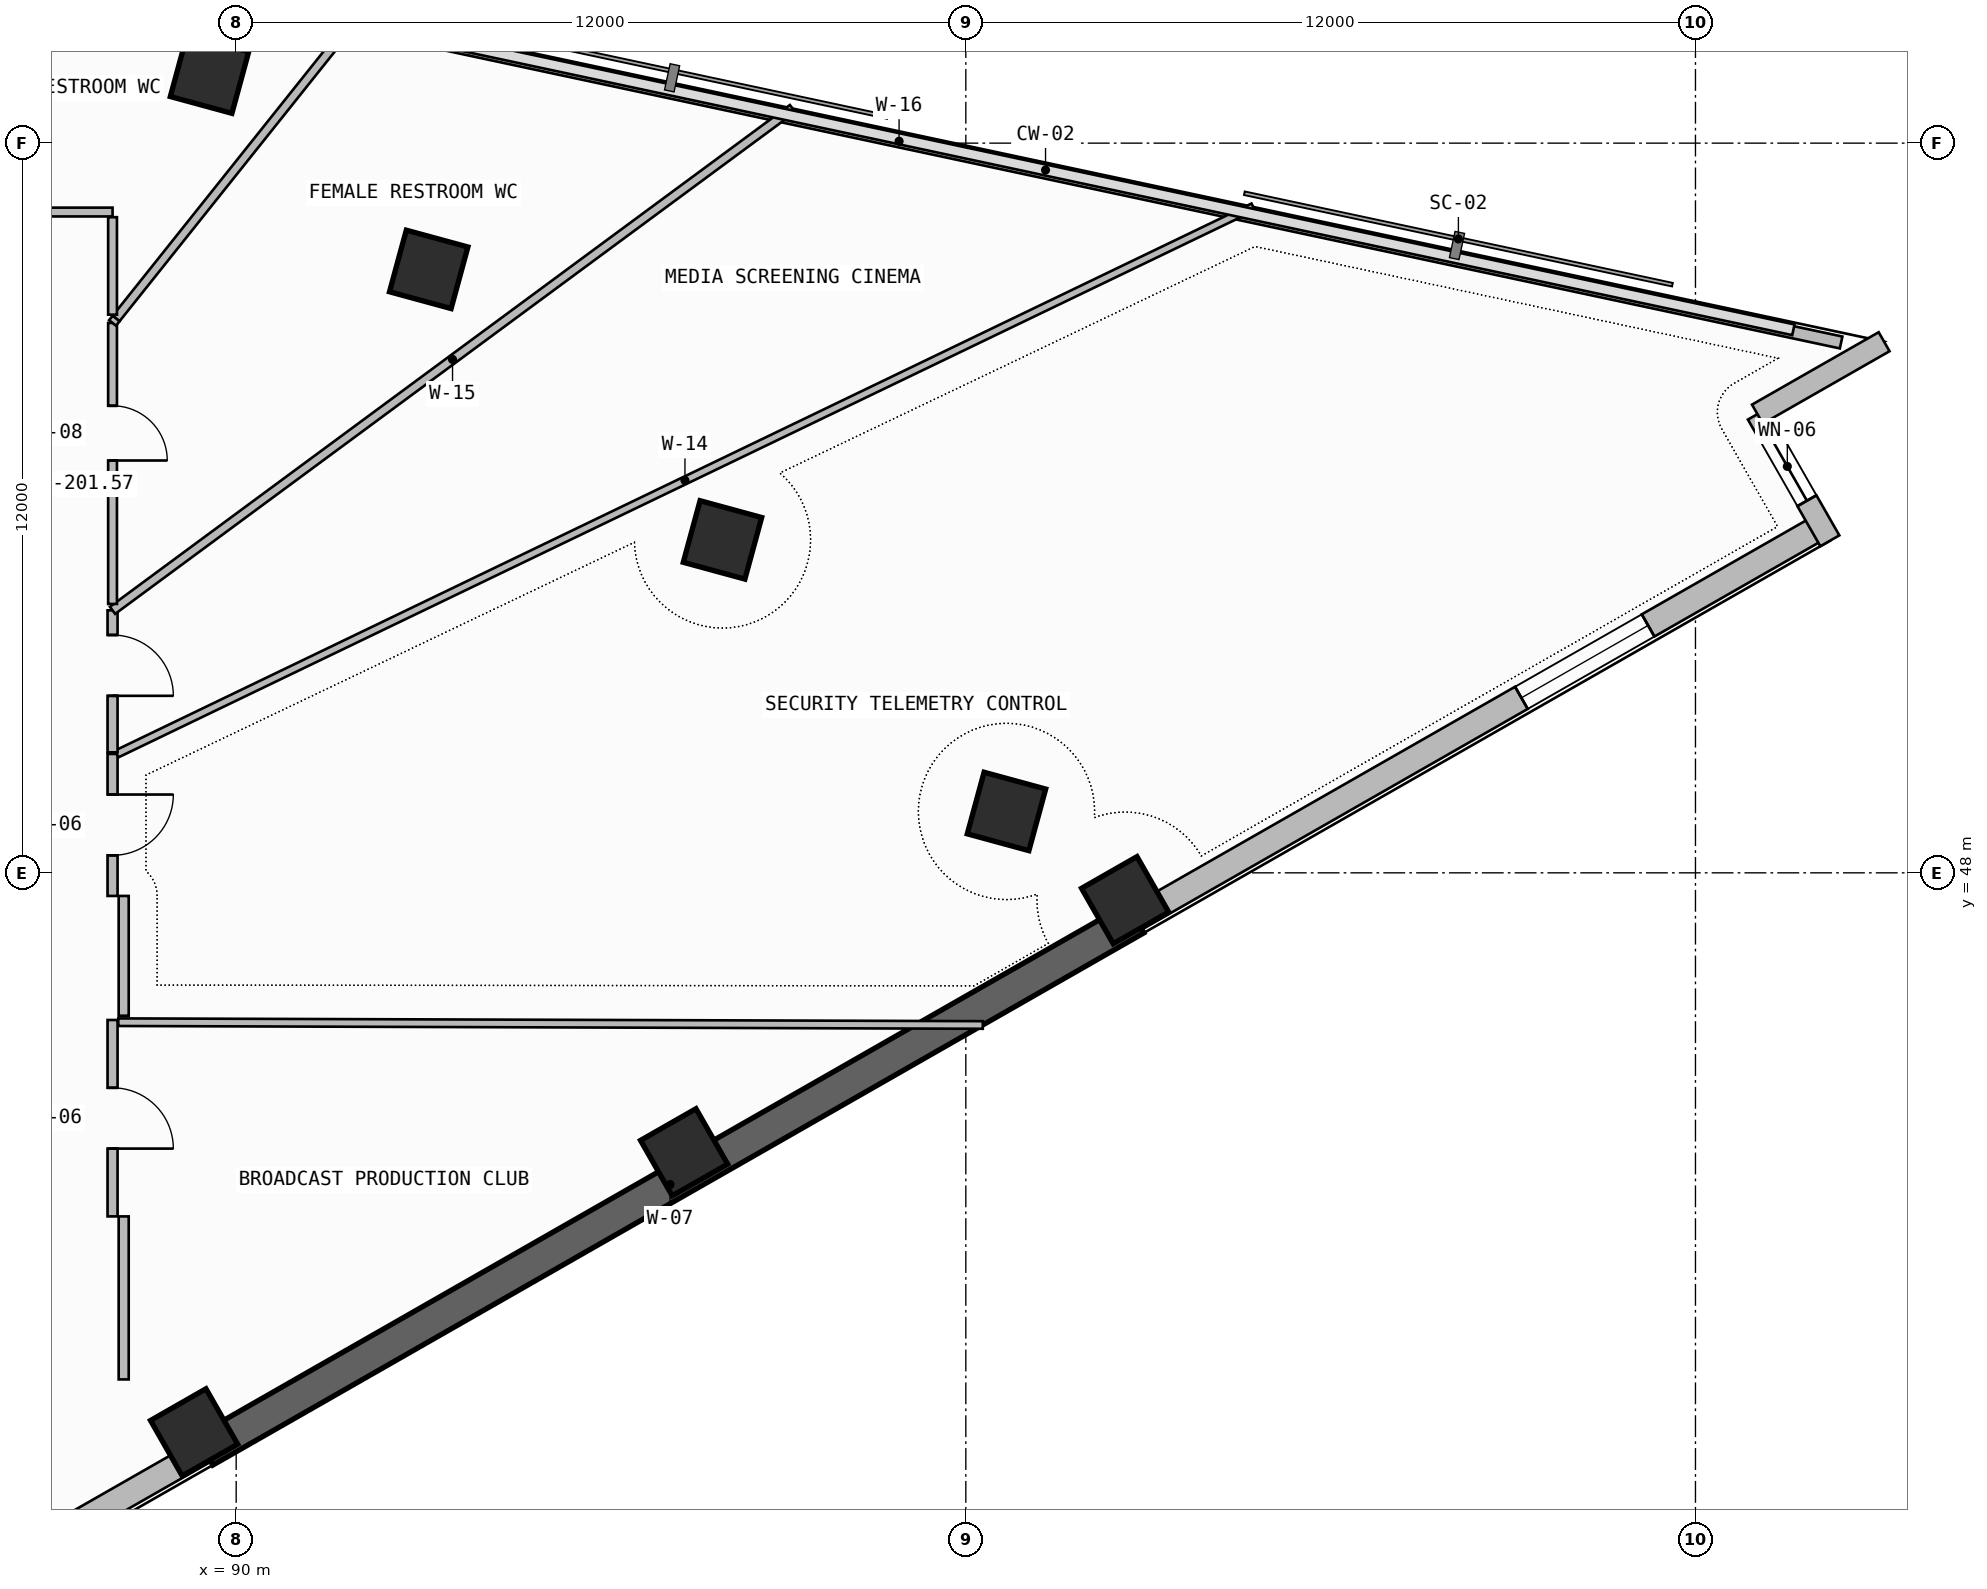
"""IFC4 building model, lengths in metres.
Left out: names, types, materials, properties, quantities, classifications, styles, units other than length and angle.
Written with IfcOpenShell. Run it as: python <this file> out.ifc"""

import sys

from ifc_helpers import new_model, si_unit, direction, frame, frame_2d, origin, origin_2d, place, context, subcontext, project, spatial, rectangle, extrude, element, fill, save


model = new_model("IFC4")
c1 = context("Model", 3, precision=1e-05, world=origin(), true_north=direction((0.0, 1.0)))
c2 = subcontext(c1, "Body", "Model", "MODEL_VIEW")
j1 = project(units=[si_unit("LENGTHUNIT", "METRE"), si_unit("PLANEANGLEUNIT", "RADIAN")], contexts=[c1])
p1 = place(None, origin())
s1 = spatial("IfcSite", under=j1, at=p1, CompositionType="ELEMENT")
p2 = place(p1, origin())
s2 = spatial("IfcBuilding", under=s1, at=p2, CompositionType="ELEMENT")
p3 = place(p2, frame((0.0, 0.0, 204.42)))
s3 = spatial("IfcBuildingStorey", under=s2, at=p3, CompositionType="ELEMENT", Elevation=204.42)
for number, where, z_axis, x_axis in (
    (1, (89.308, 38.799, 0.0), (0.0, 0.0, 1.0), (0.868, 0.496, 0.0)),
    (2, (97.367, 43.405, 0.0), (0.0, 0.0, 1.0), (0.868, 0.496, 0.0)),
    (3, (104.62, 47.55, 0.0), (0.0, 0.0, 1.0), (0.868, 0.496, 0.0)),
    (4, (102.669, 49.01, 0.0), (0.0, 0.0, 1.0), (0.263, 0.965, 0.0)),
    (5, (97.998, 53.475, 0.0), (0.0, 0.0, 1.0), (0.263, 0.965, 0.0)),
    (6, (93.167, 57.924, 0.0), (0.0, 0.0, 1.0), (0.263, 0.965, 0.0)),
    (7, (89.562, 61.135, 0.0), (0.0, 0.0, 1.0), (0.263, 0.965, 0.0)),
):
    element("IfcColumn", number, at=place(p3, frame(where, z_axis=z_axis, x_axis=x_axis)), inside=s3, PredefinedType="COLUMN", context=c2, shape_type="SweptSolid", body=[
        extrude(rectangle(XDim=1.05, YDim=1.05, at=origin_2d()), origin(), (0.0, 0.0, 1.0), 3.52),
    ])
p4 = place(p3, frame((86.1, 36.568, 0.0), z_axis=(0.0, 0.0, 1.0), x_axis=(0.868192956745, 0.496226752461, 0.0)))
e8 = element("IfcWall", 8, at=p4, inside=s3, PredefinedType="SOLIDWALL", context=c2, shape_type="SweptSolid", body=[
    extrude(rectangle(XDim=3.892, YDim=0.42, at=frame_2d((1.946, 0.0))), origin(), (0.0, 0.0, 1.0), 2.245),
])
p5 = place(p3, frame((89.479, 38.499, -0.26), z_axis=(0.0, 0.0, 1.0), x_axis=(0.868197136736, 0.496219439123, 0.0)))
e9 = element("IfcWall", 9, at=p5, inside=s3, PredefinedType="SHEAR", context=c2, shape_type="SweptSolid", body=[
    extrude(rectangle(XDim=17.636, YDim=0.55, at=frame_2d((8.818, 0.0))), origin(), (0.0, 0.0, 1.0), 3.52),
])
p6 = place(p3, frame((104.791, 47.25, 0.0), z_axis=(0.0, 0.0, 1.0), x_axis=(0.868193423982, 0.496225934987, 0.0)))
e10 = element("IfcWall", 10, at=p6, inside=s3, PredefinedType="SOLIDWALL", context=c2, shape_type="SweptSolid", body=[
    extrude(rectangle(XDim=12.995, YDim=0.42, at=frame_2d((6.498, 0.0))), origin(), (0.0, 0.0, 1.0), 2.245),
])
p7 = place(p6, frame((7.31, 0.0, 0.965)))
e11 = element("IfcOpeningElement", 11, at=p7, cuts=e10, PredefinedType="OPENING", context=c2, shape_type="SweptSolid", body=[
    extrude(rectangle(XDim=2.4, YDim=1.2, at=frame_2d((1.2, 0.6))), frame((0.0, 0.22, 0.0), z_axis=(0.0, -1.0, 0.0), x_axis=(1.0, 0.0, 0.0)), (0.0, 0.0, 1.0), 0.44),
])
p8 = place(p3, frame((116.21, 53.46, 0.0), z_axis=(0.0, 0.0, 1.0), x_axis=(-0.496215637313, 0.868199309655, 0.0)))
e12 = element("IfcWall", 12, at=p8, inside=s3, PredefinedType="SOLIDWALL", context=c2, shape_type="SweptSolid", body=[
    extrude(rectangle(XDim=2.399, YDim=0.36, at=frame_2d((1.2, 0.0))), origin(), (0.0, 0.0, 1.0), 3.26),
])
p9 = place(p8, frame((0.76, 0.0, 0.45)))
e13 = element("IfcOpeningElement", 13, at=p9, cuts=e12, PredefinedType="OPENING", context=c2, shape_type="SweptSolid", body=[
    extrude(rectangle(XDim=1.3, YDim=2.4, at=frame_2d((0.65, 1.2))), frame((0.0, 0.19, 0.0), z_axis=(0.0, -1.0, 0.0), x_axis=(1.0, 0.0, 0.0)), (0.0, 0.0, 1.0), 0.38),
])
p10 = place(p3, frame((115.019, 55.543, 0.0), z_axis=(0.0, 0.0, 1.0), x_axis=(0.86818053093, 0.4962484919, 0.0)))
e14 = element("IfcWall", 14, at=p10, inside=s3, PredefinedType="SOLIDWALL", context=c2, shape_type="SweptSolid", body=[
    extrude(rectangle(XDim=2.4, YDim=0.36, at=frame_2d((1.2, 0.0))), origin(), (0.0, 0.0, 1.0), 3.26),
])
p11 = place(p3, frame((116.396, 56.722, 0.0), z_axis=(0.0, 0.0, 1.0), x_axis=(-0.977936620644, 0.208901809478, 0.0)))
e15 = element("IfcWall", 15, at=p11, inside=s3, PredefinedType="PARAPET", context=c2, shape_type="SweptSolid", body=[
    extrude(rectangle(XDim=31.685, YDim=0.2, at=frame_2d((15.843, 0.0))), origin(), (0.0, 0.0, 1.0), 1.15),
])
p12 = place(p3, frame((87.967, 42.35, 0.0), z_axis=(0.0, 0.0, 1.0), x_axis=(0.0, 1.0, 0.0)))
e16 = element("IfcWall", 16, at=p12, inside=s3, PredefinedType="PARTITIONING", context=c2, shape_type="SweptSolid", body=[
    extrude(rectangle(XDim=3.23, YDim=0.165, at=frame_2d((1.615, 0.0))), origin(), (0.0, 0.0, 1.0), 2.745),
])
p13 = place(p12, frame((1.115, 0.0, 0.0)))
e17 = element("IfcOpeningElement", 17, at=p13, cuts=e16, PredefinedType="OPENING", context=c2, shape_type="SweptSolid", body=[
    extrude(rectangle(XDim=1.0, YDim=2.2, at=frame_2d((0.5, 1.1))), frame((0.0, 0.093, 0.0), z_axis=(0.0, -1.0, 0.0), x_axis=(1.0, 0.0, 0.0)), (0.0, 0.0, 1.0), 0.185),
])
p14 = place(p3, frame((88.15, 39.669, 0.0), z_axis=(0.0, 0.0, 1.0), x_axis=(0.0, 1.0, 0.0)))
e18 = element("IfcWall", 18, at=p14, inside=s3, PredefinedType="PARTITIONING", context=c2, shape_type="SweptSolid", body=[
    extrude(rectangle(XDim=2.681, YDim=0.165, at=frame_2d((1.34, 0.0))), origin(), (0.0, 0.0, 1.0), 2.745),
])
p15 = place(p3, frame((88.061, 45.544, 0.0), z_axis=(0.0, 0.0, 1.0), x_axis=(0.999994844725, -0.003211000497, 0.0)))
e19 = element("IfcWall", 19, at=p15, inside=s3, PredefinedType="PARTITIONING", context=c2, shape_type="SweptSolid", body=[
    extrude(rectangle(XDim=14.218, YDim=0.125, at=frame_2d((7.109, 0.0))), origin(), (0.0, 0.0, 1.0), 2.245),
])
p16 = place(p3, frame((87.967, 47.62, 0.0), z_axis=(0.0, 0.0, 1.0), x_axis=(0.0, 1.0, 0.0)))
e20 = element("IfcWall", 20, at=p16, inside=s3, PredefinedType="PARTITIONING", context=c2, shape_type="SweptSolid", body=[
    extrude(rectangle(XDim=2.335, YDim=0.165, at=frame_2d((1.167, 0.0))), origin(), (0.0, 0.0, 1.0), 3.26),
])
p17 = place(p16, frame((0.667, 0.0, 0.0)))
e21 = element("IfcOpeningElement", 21, at=p17, cuts=e20, PredefinedType="OPENING", context=c2, shape_type="SweptSolid", body=[
    extrude(rectangle(XDim=1.0, YDim=2.2, at=frame_2d((0.5, 1.1))), frame((0.0, 0.093, 0.0), z_axis=(0.0, -1.0, 0.0), x_axis=(1.0, 0.0, 0.0)), (0.0, 0.0, 1.0), 0.185),
])
p18 = place(p3, frame((88.15, 45.65, 0.0), z_axis=(0.0, 0.0, 1.0), x_axis=(0.0, 1.0, 0.0)))
e22 = element("IfcWall", 22, at=p18, inside=s3, PredefinedType="PARTITIONING", context=c2, shape_type="SweptSolid", body=[
    extrude(rectangle(XDim=1.97, YDim=0.165, at=frame_2d((0.985, 0.0))), origin(), (0.0, 0.0, 1.0), 3.26),
])
p19 = place(p3, frame((88.036, 49.955, 0.0), z_axis=(0.0, 0.0, 1.0), x_axis=(0.90105618902, 0.433702368253, 0.0)))
e23 = element("IfcWall", 23, at=p19, inside=s3, PredefinedType="PARTITIONING", context=c2, shape_type="SweptSolid", body=[
    extrude(rectangle(XDim=20.742, YDim=0.125, at=frame_2d((10.371, 0.0))), origin(), (0.0, 0.0, 1.0), 2.645),
])
p20 = place(p3, frame((87.967, 49.982, 0.0), z_axis=(0.0, 0.0, 1.0), x_axis=(0.0, 1.0, 0.0)))
e24 = element("IfcWall", 24, at=p20, inside=s3, PredefinedType="PARTITIONING", context=c2, shape_type="SweptSolid", body=[
    extrude(rectangle(XDim=2.335, YDim=0.165, at=frame_2d((1.167, 0.0))), origin(), (0.0, 0.0, 1.0), 3.26),
])
p21 = place(p20, frame((0.929, 0.0, 0.0)))
e25 = element("IfcOpeningElement", 25, at=p21, cuts=e24, PredefinedType="OPENING", context=c2, shape_type="SweptSolid", body=[
    extrude(rectangle(XDim=1.0, YDim=2.2, at=frame_2d((0.5, 1.1))), frame((0.0, 0.093, 0.0), z_axis=(0.0, -1.0, 0.0), x_axis=(1.0, 0.0, 0.0)), (0.0, 0.0, 1.0), 0.185),
])
p22 = place(p3, frame((87.967, 52.317, 0.0), z_axis=(0.0, 0.0, 1.0), x_axis=(0.804642818132, 0.593759155911, 0.0)))
e26 = element("IfcWall", 26, at=p22, inside=s3, PredefinedType="PARTITIONING", context=c2, shape_type="SweptSolid", body=[
    extrude(rectangle(XDim=13.898, YDim=0.145, at=frame_2d((6.949, 0.0))), origin(), (0.0, 0.0, 1.0), 2.645),
])
p23 = place(p3, frame((87.967, 52.422, 0.0), z_axis=(0.0, 0.0, 1.0), x_axis=(0.0, 1.0, 0.0)))
e27 = element("IfcWall", 27, at=p23, inside=s3, PredefinedType="PARTITIONING", context=c2, shape_type="SweptSolid", body=[
    extrude(rectangle(XDim=4.621, YDim=0.145, at=frame_2d((2.311, 0.0))), origin(), (0.0, 0.0, 1.0), 2.745),
])
p24 = place(p23, frame((2.359, 0.0, 0.0)))
e28 = element("IfcOpeningElement", 28, at=p24, cuts=e27, PredefinedType="OPENING", context=c2, shape_type="SweptSolid", body=[
    extrude(rectangle(XDim=0.9, YDim=2.1, at=frame_2d((0.45, 1.05))), frame((0.0, 0.083, 0.0), z_axis=(0.0, -1.0, 0.0), x_axis=(1.0, 0.0, 0.0)), (0.0, 0.0, 1.0), 0.165),
])
p25 = place(p3, frame((87.967, 57.043, 0.0), z_axis=(0.0, 0.0, 1.0), x_axis=(0.62407609663, 0.781363568139, 0.0)))
e29 = element("IfcWall", 29, at=p25, inside=s3, PredefinedType="PARTITIONING", context=c2, shape_type="SweptSolid", body=[
    extrude(rectangle(XDim=0.096, YDim=0.145, at=frame_2d((0.048, 0.0))), origin(), (0.0, 0.0, 1.0), 2.745),
])
p26 = place(p3, frame((88.027, 57.118, 0.0), z_axis=(0.0, 0.0, 1.0), x_axis=(0.623829889611, 0.781560150486, 0.0)))
e30 = element("IfcWall", 30, at=p26, inside=s3, PredefinedType="PARTITIONING", context=c2, shape_type="SweptSolid", body=[
    extrude(rectangle(XDim=6.369, YDim=0.145, at=frame_2d((3.185, 0.0))), origin(), (0.0, 0.0, 1.0), 2.645),
])
p27 = place(p3, frame((87.967, 58.867, 0.0), z_axis=(0.0, 0.0, 1.0), x_axis=(-1.0, 0.0, 0.0)))
e31 = element("IfcWall", 31, at=p27, inside=s3, PredefinedType="PARTITIONING", context=c2, shape_type="SweptSolid", body=[
    extrude(rectangle(XDim=5.884, YDim=0.145, at=frame_2d((2.942, 0.0))), origin(), (0.0, 0.0, 1.0), 2.745),
])
p28 = place(p27, frame((3.179, 0.0, 0.0)))
e32 = element("IfcOpeningElement", 32, at=p28, cuts=e31, PredefinedType="OPENING", context=c2, shape_type="SweptSolid", body=[
    extrude(rectangle(XDim=0.9, YDim=2.1, at=frame_2d((0.45, 1.05))), frame((0.0, 0.083, 0.0), z_axis=(0.0, -1.0, 0.0), x_axis=(1.0, 0.0, 0.0)), (0.0, 0.0, 1.0), 0.165),
])
p29 = place(p3, frame((87.967, 57.179, 0.0), z_axis=(0.0, 0.0, 1.0), x_axis=(0.0, 1.0, 0.0)))
e33 = element("IfcWall", 33, at=p29, inside=s3, PredefinedType="PARTITIONING", context=c2, shape_type="SweptSolid", body=[
    extrude(rectangle(XDim=1.604, YDim=0.145, at=frame_2d((0.802, 0.0))), origin(), (0.0, 0.0, 1.0), 2.745),
])
p30 = place(p7, origin())
e34 = element("IfcWindow", 34, at=p30, inside=s3, PartitioningType="SINGLE_PANEL", PredefinedType="WINDOW", context=c2, shape_type="SweptSolid", body=[
    extrude(rectangle(XDim=2.4, YDim=1.2, at=frame_2d((1.2, 0.6))), frame((0.0, 0.03, 0.0), z_axis=(0.0, -1.0, 0.0), x_axis=(1.0, 0.0, 0.0)), (0.0, 0.0, 1.0), 0.06),
])
fill(e11, e34)
p31 = place(p9, origin())
e35 = element("IfcWindow", 35, at=p31, inside=s3, PartitioningType="SINGLE_PANEL", PredefinedType="WINDOW", context=c2, shape_type="SweptSolid", body=[
    extrude(rectangle(XDim=1.3, YDim=2.4, at=frame_2d((0.65, 1.2))), frame((0.0, 0.03, 0.0), z_axis=(0.0, -1.0, 0.0), x_axis=(1.0, 0.0, 0.0)), (0.0, 0.0, 1.0), 0.06),
])
fill(e13, e35)
p32 = place(p13, frame((1.0, 0.0, 0.0), z_axis=(0.0, 0.0, 1.0), x_axis=(-1.0, 0.0, 0.0)))
e36 = element("IfcDoor", 36, at=p32, inside=s3, OperationType="SINGLE_SWING_RIGHT", PredefinedType="DOOR", context=c2, shape_type="SweptSolid", body=[
    extrude(rectangle(XDim=1.0, YDim=2.2, at=frame_2d((0.5, 1.1))), frame((0.0, 0.025, 0.0), z_axis=(0.0, -1.0, 0.0), x_axis=(1.0, 0.0, 0.0)), (0.0, 0.0, 1.0), 0.05),
])
fill(e17, e36)
p33 = place(p17, frame((1.0, 0.0, 0.0), z_axis=(0.0, 0.0, 1.0), x_axis=(-1.0, 0.0, 0.0)))
e37 = element("IfcDoor", 37, at=p33, inside=s3, OperationType="SINGLE_SWING_LEFT", PredefinedType="DOOR", context=c2, shape_type="SweptSolid", body=[
    extrude(rectangle(XDim=1.0, YDim=2.2, at=frame_2d((0.5, 1.1))), frame((0.0, 0.025, 0.0), z_axis=(0.0, -1.0, 0.0), x_axis=(1.0, 0.0, 0.0)), (0.0, 0.0, 1.0), 0.05),
])
fill(e21, e37)
p34 = place(p21, frame((1.0, 0.0, 0.0), z_axis=(0.0, 0.0, 1.0), x_axis=(-1.0, 0.0, 0.0)))
e38 = element("IfcDoor", 38, at=p34, inside=s3, OperationType="SINGLE_SWING_RIGHT", PredefinedType="DOOR", context=c2, shape_type="SweptSolid", body=[
    extrude(rectangle(XDim=1.0, YDim=2.2, at=frame_2d((0.5, 1.1))), frame((0.0, 0.025, 0.0), z_axis=(0.0, -1.0, 0.0), x_axis=(1.0, 0.0, 0.0)), (0.0, 0.0, 1.0), 0.05),
])
fill(e25, e38)
p35 = place(p24, frame((0.9, 0.0, 0.0), z_axis=(0.0, 0.0, 1.0), x_axis=(-1.0, 0.0, 0.0)))
e39 = element("IfcDoor", 39, at=p35, inside=s3, OperationType="SINGLE_SWING_RIGHT", PredefinedType="DOOR", context=c2, shape_type="SweptSolid", body=[
    extrude(rectangle(XDim=0.9, YDim=2.1, at=frame_2d((0.45, 1.05))), frame((0.0, 0.025, 0.0), z_axis=(0.0, -1.0, 0.0), x_axis=(1.0, 0.0, 0.0)), (0.0, 0.0, 1.0), 0.05),
])
fill(e28, e39)
save(model, sys.argv[1])
